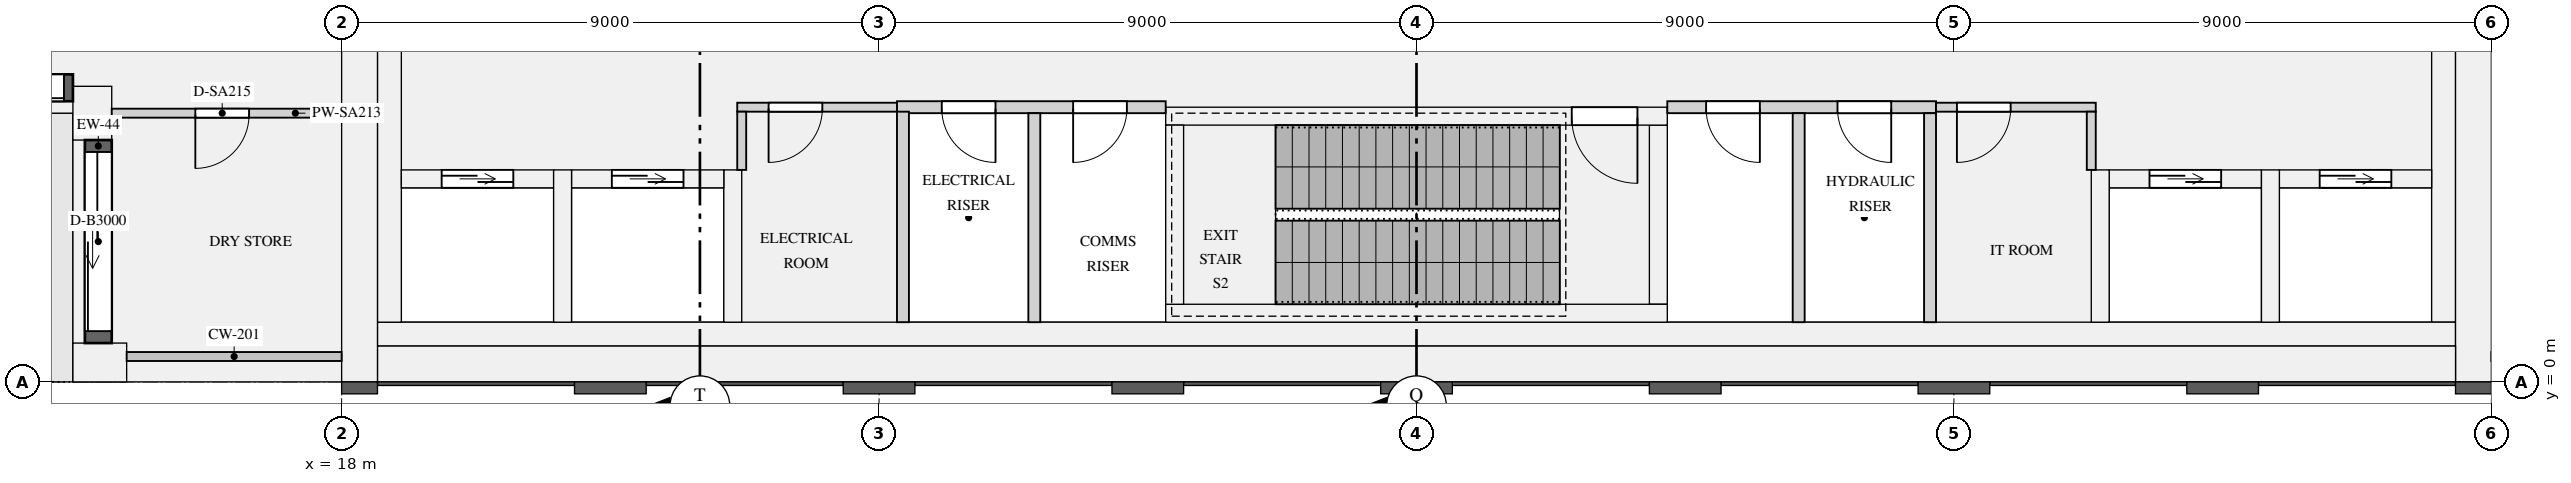
"""IFC4 building model, lengths in metres.
Left out: names, types, materials, properties, quantities, classifications, styles, units other than length and angle.
Written with IfcOpenShell. Run it as: python <this file> out.ifc"""

import sys

from ifc_helpers import new_model, si_unit, direction, frame, frame_2d, origin, origin_2d, place, context, subcontext, project, spatial, rectangle, extrude, element, fill, save


model = new_model("IFC4")
c1 = context("Model", 3, precision=1e-05, world=origin(), true_north=direction((0.0, 1.0)))
c2 = subcontext(c1, "Body", "Model", "MODEL_VIEW")
j1 = project(units=[si_unit("LENGTHUNIT", "METRE"), si_unit("PLANEANGLEUNIT", "RADIAN")], contexts=[c1])
p1 = place(None, origin())
s1 = spatial("IfcSite", under=j1, at=p1, CompositionType="ELEMENT")
p2 = place(p1, origin())
s2 = spatial("IfcBuilding", under=s1, at=p2, CompositionType="ELEMENT")
p3 = place(p2, frame((0.0, 0.0, 191.7)))
s3 = spatial("IfcBuildingStorey", under=s2, at=p3, CompositionType="ELEMENT", Elevation=191.7)
for number, where, z_axis, x_axis in (
    (1, (13.95, 0.325, 0.0), (0.0, 0.0, 1.0), (1.0, 0.0, 0.0)),
    (2, (13.825, 4.5, 0.0), (0.0, 0.0, 1.0), (0.0, -1.0, 0.0)),
):
    element("IfcColumn", number, at=place(p3, frame(where, z_axis=z_axis, x_axis=x_axis)), inside=s3, PredefinedType="USERDEFINED", context=c2, shape_type="SweptSolid", body=[
        extrude(rectangle(XDim=0.9, YDim=0.65, at=origin_2d()), origin(), (0.0, 0.0, 1.0), 6.3),
    ])
for number, where, z_axis, x_axis in (
    (3, (18.3, 0.0, 0.0), (0.0, 0.0, 1.0), (0.0, 1.0, 0.0)),
    (4, (53.7, 0.0, 0.0), (0.0, 0.0, 1.0), (0.0, 1.0, 0.0)),
):
    element("IfcWall", number, at=place(p3, frame(where, z_axis=z_axis, x_axis=x_axis)), inside=s3, PredefinedType="SHEAR", context=c2, shape_type="SweptSolid", body=[
        extrude(rectangle(XDim=12.5, YDim=0.6, at=frame_2d((6.25, 0.0))), origin(), (0.0, 0.0, 1.0), 6.3),
    ])
p4 = place(p3, frame((18.6, 0.3, 0.0), z_axis=(0.0, 0.0, 1.0), x_axis=(1.0, 0.0, 0.0)))
e5 = element("IfcWall", 5, at=p4, inside=s3, PredefinedType="SHEAR", context=c2, shape_type="SweptSolid", body=[
    extrude(rectangle(XDim=34.8, YDim=0.6, at=frame_2d((17.4, 0.0))), origin(), (0.0, 0.0, 1.0), 6.3),
])
for number, where, z_axis, x_axis in (
    (6, (18.8, 1.0, 0.0), (0.0, 0.0, 1.0), (0.0, 1.0, 0.0)),
    (7, (53.2, 1.0, 0.0), (0.0, 0.0, 1.0), (0.0, 1.0, 0.0)),
):
    element("IfcWall", number, at=place(p3, frame(where, z_axis=z_axis, x_axis=x_axis)), inside=s3, PredefinedType="SHEAR", context=c2, shape_type="SweptSolid", body=[
        extrude(rectangle(XDim=10.9, YDim=0.4, at=frame_2d((5.45, 0.0))), origin(), (0.0, 0.0, 1.0), 6.3),
    ])
p5 = place(p3, frame((18.6, 0.8, 0.0), z_axis=(0.0, 0.0, 1.0), x_axis=(1.0, 0.0, 0.0)))
e8 = element("IfcWall", 8, at=p5, inside=s3, PredefinedType="SHEAR", context=c2, shape_type="SweptSolid", body=[
    extrude(rectangle(XDim=34.8, YDim=0.4, at=frame_2d((17.4, 0.0))), origin(), (0.0, 0.0, 1.0), 6.3),
])
p6 = place(p3, frame((19.0, 3.4, 0.0), z_axis=(0.0, 0.0, 1.0), x_axis=(1.0, 0.0, 0.0)))
e9 = element("IfcWall", 9, at=p6, inside=s3, PredefinedType="SHEAR", context=c2, shape_type="SweptSolid", body=[
    extrude(rectangle(XDim=2.55, YDim=0.3, at=frame_2d((1.275, 0.0))), origin(), (0.0, 0.0, 1.0), 6.3),
])
p7 = place(p6, frame((0.675, 0.0, 0.0)))
e10 = element("IfcOpeningElement", 10, at=p7, cuts=e9, PredefinedType="OPENING", context=c2, shape_type="SweptSolid", body=[
    extrude(rectangle(XDim=1.2, YDim=2.1, at=frame_2d((0.6, 1.05))), frame((0.0, 0.16, 0.0), z_axis=(0.0, -1.0, 0.0), x_axis=(1.0, 0.0, 0.0)), (0.0, 0.0, 1.0), 0.32),
])
p8 = place(p3, frame((21.85, 3.4, 0.0), z_axis=(0.0, 0.0, 1.0), x_axis=(1.0, 0.0, 0.0)))
e11 = element("IfcWall", 11, at=p8, inside=s3, PredefinedType="SHEAR", context=c2, shape_type="SweptSolid", body=[
    extrude(rectangle(XDim=2.55, YDim=0.3, at=frame_2d((1.275, 0.0))), origin(), (0.0, 0.0, 1.0), 6.3),
])
p9 = place(p8, frame((0.675, 0.0, 0.0)))
e12 = element("IfcOpeningElement", 12, at=p9, cuts=e11, PredefinedType="OPENING", context=c2, shape_type="SweptSolid", body=[
    extrude(rectangle(XDim=1.2, YDim=2.1, at=frame_2d((0.6, 1.05))), frame((0.0, 0.16, 0.0), z_axis=(0.0, -1.0, 0.0), x_axis=(1.0, 0.0, 0.0)), (0.0, 0.0, 1.0), 0.32),
])
for number, where, z_axis, x_axis in (
    (13, (21.7, 1.0, 0.0), (0.0, 0.0, 1.0), (0.0, 1.0, 0.0)),
    (14, (24.55, 1.0, 0.0), (0.0, 0.0, 1.0), (0.0, 1.0, 0.0)),
):
    element("IfcWall", number, at=place(p3, frame(where, z_axis=z_axis, x_axis=x_axis)), inside=s3, PredefinedType="SHEAR", context=c2, shape_type="SweptSolid", body=[
        extrude(rectangle(XDim=2.55, YDim=0.3, at=frame_2d((1.275, 0.0))), origin(), (0.0, 0.0, 1.0), 6.3),
    ])
p10 = place(p3, frame((47.6, 3.4, 0.0), z_axis=(0.0, 0.0, 1.0), x_axis=(1.0, 0.0, 0.0)))
e15 = element("IfcWall", 15, at=p10, inside=s3, PredefinedType="SHEAR", context=c2, shape_type="SweptSolid", body=[
    extrude(rectangle(XDim=2.55, YDim=0.3, at=frame_2d((1.275, 0.0))), origin(), (0.0, 0.0, 1.0), 6.3),
])
p11 = place(p10, frame((0.675, 0.0, 0.0)))
e16 = element("IfcOpeningElement", 16, at=p11, cuts=e15, PredefinedType="OPENING", context=c2, shape_type="SweptSolid", body=[
    extrude(rectangle(XDim=1.2, YDim=2.1, at=frame_2d((0.6, 1.05))), frame((0.0, 0.16, 0.0), z_axis=(0.0, -1.0, 0.0), x_axis=(1.0, 0.0, 0.0)), (0.0, 0.0, 1.0), 0.32),
])
p12 = place(p3, frame((47.45, 1.0, 0.0), z_axis=(0.0, 0.0, 1.0), x_axis=(0.0, 1.0, 0.0)))
e17 = element("IfcWall", 17, at=p12, inside=s3, PredefinedType="SHEAR", context=c2, shape_type="SweptSolid", body=[
    extrude(rectangle(XDim=2.55, YDim=0.3, at=frame_2d((1.275, 0.0))), origin(), (0.0, 0.0, 1.0), 6.3),
])
p13 = place(p3, frame((50.45, 3.4, 0.0), z_axis=(0.0, 0.0, 1.0), x_axis=(1.0, 0.0, 0.0)))
e18 = element("IfcWall", 18, at=p13, inside=s3, PredefinedType="SHEAR", context=c2, shape_type="SweptSolid", body=[
    extrude(rectangle(XDim=2.55, YDim=0.3, at=frame_2d((1.275, 0.0))), origin(), (0.0, 0.0, 1.0), 6.3),
])
p14 = place(p13, frame((0.675, 0.0, 0.0)))
e19 = element("IfcOpeningElement", 19, at=p14, cuts=e18, PredefinedType="OPENING", context=c2, shape_type="SweptSolid", body=[
    extrude(rectangle(XDim=1.2, YDim=2.1, at=frame_2d((0.6, 1.05))), frame((0.0, 0.16, 0.0), z_axis=(0.0, -1.0, 0.0), x_axis=(1.0, 0.0, 0.0)), (0.0, 0.0, 1.0), 0.32),
])
p15 = place(p3, frame((50.3, 1.0, 0.0), z_axis=(0.0, 0.0, 1.0), x_axis=(0.0, 1.0, 0.0)))
e20 = element("IfcWall", 20, at=p15, inside=s3, PredefinedType="SHEAR", context=c2, shape_type="SweptSolid", body=[
    extrude(rectangle(XDim=2.55, YDim=0.3, at=frame_2d((1.275, 0.0))), origin(), (0.0, 0.0, 1.0), 6.3),
])
p16 = place(p3, frame((31.8, 1.15, 0.0), z_axis=(0.0, 0.0, 1.0), x_axis=(1.0, 0.0, 0.0)))
e21 = element("IfcWall", 21, at=p16, inside=s3, PredefinedType="SHEAR", context=c2, shape_type="SweptSolid", body=[
    extrude(rectangle(XDim=8.4, YDim=0.3, at=frame_2d((4.2, 0.0))), origin(), (0.0, 0.0, 1.0), 6.3),
])
p17 = place(p3, frame((31.8, 4.45, 0.0), z_axis=(0.0, 0.0, 1.0), x_axis=(1.0, 0.0, 0.0)))
e22 = element("IfcWall", 22, at=p17, inside=s3, PredefinedType="SHEAR", context=c2, shape_type="SweptSolid", body=[
    extrude(rectangle(XDim=8.4, YDim=0.3, at=frame_2d((4.2, 0.0))), origin(), (0.0, 0.0, 1.0), 6.3),
])
p18 = place(p17, frame((6.8, 0.0, 0.0)))
e23 = element("IfcOpeningElement", 23, at=p18, cuts=e22, PredefinedType="OPENING", context=c2, shape_type="SweptSolid", body=[
    extrude(rectangle(XDim=1.1, YDim=2.1, at=frame_2d((0.55, 1.05))), frame((0.0, 0.16, 0.0), z_axis=(0.0, -1.0, 0.0), x_axis=(1.0, 0.0, 0.0)), (0.0, 0.0, 1.0), 0.32),
])
for number, where, z_axis, x_axis in (
    (24, (31.95, 1.3, 0.0), (0.0, 0.0, 1.0), (0.0, 1.0, 0.0)),
    (25, (40.05, 1.3, 0.0), (0.0, 0.0, 1.0), (0.0, 1.0, 0.0)),
):
    element("IfcWall", number, at=place(p3, frame(where, z_axis=z_axis, x_axis=x_axis)), inside=s3, PredefinedType="SHEAR", context=c2, shape_type="SweptSolid", body=[
        extrude(rectangle(XDim=3.0, YDim=0.3, at=frame_2d((1.5, 0.0))), origin(), (0.0, 0.0, 1.0), 6.3),
    ])
p19 = place(p3, frame((9.9, 4.925, 0.0), z_axis=(0.0, 0.0, 1.0), x_axis=(1.0, 0.0, 0.0)))
e26 = element("IfcWall", 26, at=p19, inside=s3, PredefinedType="SOLIDWALL", context=c2, shape_type="SweptSolid", body=[
    extrude(rectangle(XDim=3.6, YDim=0.45, at=frame_2d((1.8, 0.0))), origin(), (0.0, 0.0, 1.0), 5.98),
])
p20 = place(p19, frame((0.15, 0.0, 0.0)))
e27 = element("IfcOpeningElement", 27, at=p20, cuts=e26, PredefinedType="OPENING", context=c2, shape_type="SweptSolid", body=[
    extrude(rectangle(XDim=3.3, YDim=2.3, at=frame_2d((1.65, 1.15))), frame((0.0, 0.235, 0.0), z_axis=(0.0, -1.0, 0.0), x_axis=(1.0, 0.0, 0.0)), (0.0, 0.0, 1.0), 0.47),
])
p21 = place(p3, frame((13.925, 4.05, 0.0), z_axis=(0.0, 0.0, 1.0), x_axis=(0.0, -1.0, 0.0)))
e28 = element("IfcWall", 28, at=p21, inside=s3, PredefinedType="SOLIDWALL", context=c2, shape_type="SweptSolid", body=[
    extrude(rectangle(XDim=3.4, YDim=0.45, at=frame_2d((1.7, 0.0))), origin(), (0.0, 0.0, 1.0), 5.98),
])
p22 = place(p21, frame((0.2, 0.0, 0.0)))
e29 = element("IfcOpeningElement", 29, at=p22, cuts=e28, PredefinedType="OPENING", context=c2, shape_type="SweptSolid", body=[
    extrude(rectangle(XDim=3.0, YDim=2.3, at=frame_2d((1.5, 1.15))), frame((0.0, 0.235, 0.0), z_axis=(0.0, -1.0, 0.0), x_axis=(1.0, 0.0, 0.0)), (0.0, 0.0, 1.0), 0.47),
])
p23 = place(p3, frame((27.3, 4.6, 0.0), z_axis=(0.0, 0.0, 1.0), x_axis=(1.0, 0.0, 0.0)))
e30 = element("IfcWall", 30, at=p23, inside=s3, PredefinedType="PARTITIONING", context=c2, shape_type="SweptSolid", body=[
    extrude(rectangle(XDim=4.5, YDim=0.2, at=frame_2d((2.25, 0.0))), origin(), (0.0, 0.0, 1.0), 5.98),
])
p24 = place(p23, frame((0.75, 0.0, 0.0)))
e31 = element("IfcOpeningElement", 31, at=p24, cuts=e30, PredefinedType="OPENING", context=c2, shape_type="SweptSolid", body=[
    extrude(rectangle(XDim=0.9, YDim=2.1, at=frame_2d((0.45, 1.05))), frame((0.0, 0.11, 0.0), z_axis=(0.0, -1.0, 0.0), x_axis=(1.0, 0.0, 0.0)), (0.0, 0.0, 1.0), 0.22),
])
p25 = place(p23, frame((2.95, 0.0, 0.0)))
e32 = element("IfcOpeningElement", 32, at=p25, cuts=e30, PredefinedType="OPENING", context=c2, shape_type="SweptSolid", body=[
    extrude(rectangle(XDim=0.9, YDim=2.1, at=frame_2d((0.45, 1.05))), frame((0.0, 0.11, 0.0), z_axis=(0.0, -1.0, 0.0), x_axis=(1.0, 0.0, 0.0)), (0.0, 0.0, 1.0), 0.22),
])
p26 = place(p3, frame((40.2, 4.6, 0.0), z_axis=(0.0, 0.0, 1.0), x_axis=(1.0, 0.0, 0.0)))
e33 = element("IfcWall", 33, at=p26, inside=s3, PredefinedType="PARTITIONING", context=c2, shape_type="SweptSolid", body=[
    extrude(rectangle(XDim=4.5, YDim=0.2, at=frame_2d((2.25, 0.0))), origin(), (0.0, 0.0, 1.0), 5.98),
])
p27 = place(p26, frame((0.65, 0.0, 0.0)))
e34 = element("IfcOpeningElement", 34, at=p27, cuts=e33, PredefinedType="OPENING", context=c2, shape_type="SweptSolid", body=[
    extrude(rectangle(XDim=0.9, YDim=2.1, at=frame_2d((0.45, 1.05))), frame((0.0, 0.11, 0.0), z_axis=(0.0, -1.0, 0.0), x_axis=(1.0, 0.0, 0.0)), (0.0, 0.0, 1.0), 0.22),
])
p28 = place(p26, frame((2.85, 0.0, 0.0)))
e35 = element("IfcOpeningElement", 35, at=p28, cuts=e33, PredefinedType="OPENING", context=c2, shape_type="SweptSolid", body=[
    extrude(rectangle(XDim=0.9, YDim=2.1, at=frame_2d((0.45, 1.05))), frame((0.0, 0.11, 0.0), z_axis=(0.0, -1.0, 0.0), x_axis=(1.0, 0.0, 0.0)), (0.0, 0.0, 1.0), 0.22),
])
p29 = place(p3, frame((24.625, 4.6, 0.0), z_axis=(0.0, 0.0, 1.0), x_axis=(1.0, 0.0, 0.0)))
e36 = element("IfcWall", 36, at=p29, inside=s3, PredefinedType="PARTITIONING", context=c2, shape_type="SweptSolid", body=[
    extrude(rectangle(XDim=2.675, YDim=0.15, at=frame_2d((1.337, 0.0))), origin(), (0.0, 0.0, 1.0), 5.98),
])
p30 = place(p29, frame((0.525, 0.0, 0.0)))
e37 = element("IfcOpeningElement", 37, at=p30, cuts=e36, PredefinedType="OPENING", context=c2, shape_type="SweptSolid", body=[
    extrude(rectangle(XDim=0.9, YDim=2.1, at=frame_2d((0.45, 1.05))), frame((0.0, 0.085, 0.0), z_axis=(0.0, -1.0, 0.0), x_axis=(1.0, 0.0, 0.0)), (0.0, 0.0, 1.0), 0.17),
])
p31 = place(p3, frame((44.7, 4.6, 0.0), z_axis=(0.0, 0.0, 1.0), x_axis=(1.0, 0.0, 0.0)))
e38 = element("IfcWall", 38, at=p31, inside=s3, PredefinedType="PARTITIONING", context=c2, shape_type="SweptSolid", body=[
    extrude(rectangle(XDim=2.675, YDim=0.15, at=frame_2d((1.337, 0.0))), origin(), (0.0, 0.0, 1.0), 5.98),
])
p32 = place(p31, frame((0.35, 0.0, 0.0)))
e39 = element("IfcOpeningElement", 39, at=p32, cuts=e38, PredefinedType="OPENING", context=c2, shape_type="SweptSolid", body=[
    extrude(rectangle(XDim=0.9, YDim=2.1, at=frame_2d((0.45, 1.05))), frame((0.0, 0.085, 0.0), z_axis=(0.0, -1.0, 0.0), x_axis=(1.0, 0.0, 0.0)), (0.0, 0.0, 1.0), 0.17),
])
p33 = place(p3, frame((27.4, 1.0, 0.0), z_axis=(0.0, 0.0, 1.0), x_axis=(0.0, 1.0, 0.0)))
e40 = element("IfcWall", 40, at=p33, inside=s3, PredefinedType="PARTITIONING", context=c2, shape_type="SweptSolid", body=[
    extrude(rectangle(XDim=3.525, YDim=0.2, at=frame_2d((1.762, 0.0))), origin(), (0.0, 0.0, 1.0), 5.98),
])
for number, where, z_axis, x_axis in (
    (41, (29.6, 1.0, 0.0), (0.0, 0.0, 1.0), (0.0, 1.0, 0.0)),
    (42, (42.4, 1.0, 0.0), (0.0, 0.0, 1.0), (0.0, 1.0, 0.0)),
    (43, (44.6, 1.0, 0.0), (0.0, 0.0, 1.0), (0.0, 1.0, 0.0)),
):
    element("IfcWall", number, at=place(p3, frame(where, z_axis=z_axis, x_axis=x_axis)), inside=s3, PredefinedType="PARTITIONING", context=c2, shape_type="SweptSolid", body=[
        extrude(rectangle(XDim=3.5, YDim=0.2, at=frame_2d((1.75, 0.0))), origin(), (0.0, 0.0, 1.0), 5.98),
    ])
for number, where, z_axis, x_axis in (
    (44, (24.7, 3.55, 0.0), (0.0, 0.0, 1.0), (0.0, 1.0, 0.0)),
    (45, (47.3, 3.55, 0.0), (0.0, 0.0, 1.0), (0.0, 1.0, 0.0)),
):
    element("IfcWall", number, at=place(p3, frame(where, z_axis=z_axis, x_axis=x_axis)), inside=s3, PredefinedType="PARTITIONING", context=c2, shape_type="SweptSolid", body=[
        extrude(rectangle(XDim=0.975, YDim=0.15, at=frame_2d((0.487, 0.0))), origin(), (0.0, 0.0, 1.0), 5.98),
    ])
p34 = place(p3, frame((14.15, 4.5, 0.0), z_axis=(0.0, 0.0, 1.0), x_axis=(1.0, 0.0, 0.0)))
e46 = element("IfcWall", 46, at=p34, inside=s3, PredefinedType="PARTITIONING", context=c2, shape_type="SweptSolid", body=[
    extrude(rectangle(XDim=3.85, YDim=0.15, at=frame_2d((1.925, 0.0))), origin(), (0.0, 0.0, 1.0), 5.98),
])
p35 = place(p34, frame((1.4, 0.0, 0.0)))
e47 = element("IfcOpeningElement", 47, at=p35, cuts=e46, PredefinedType="OPENING", context=c2, shape_type="SweptSolid", body=[
    extrude(rectangle(XDim=0.9, YDim=2.1, at=frame_2d((0.45, 1.05))), frame((0.0, 0.085, 0.0), z_axis=(0.0, -1.0, 0.0), x_axis=(1.0, 0.0, 0.0)), (0.0, 0.0, 1.0), 0.17),
])
p36 = place(p20, origin())
e48 = element("IfcDoor", 48, at=p36, inside=s3, OperationType="SLIDING_TO_LEFT", PredefinedType="DOOR", context=c2, shape_type="SweptSolid", body=[
    extrude(rectangle(XDim=3.3, YDim=2.3, at=frame_2d((1.65, 1.15))), frame((0.0, -0.07, 0.0), z_axis=(0.0, -1.0, 0.0), x_axis=(1.0, 0.0, 0.0)), (0.0, 0.0, 1.0), 0.05),
])
fill(e27, e48)
p37 = place(p22, origin())
e49 = element("IfcDoor", 49, at=p37, inside=s3, OperationType="SLIDING_TO_LEFT", PredefinedType="DOOR", context=c2, shape_type="SweptSolid", body=[
    extrude(rectangle(XDim=3.0, YDim=2.3, at=frame_2d((1.5, 1.15))), frame((0.0, -0.07, 0.0), z_axis=(0.0, -1.0, 0.0), x_axis=(1.0, 0.0, 0.0)), (0.0, 0.0, 1.0), 0.05),
])
fill(e29, e49)
p38 = place(p7, origin())
e50 = element("IfcDoor", 50, at=p38, inside=s3, OperationType="DOUBLE_DOOR_SLIDING", PredefinedType="DOOR", context=c2, shape_type="SweptSolid", body=[
    extrude(rectangle(XDim=1.2, YDim=2.1, at=frame_2d((0.6, 1.05))), frame((0.0, 0.025, 0.0), z_axis=(0.0, -1.0, 0.0), x_axis=(1.0, 0.0, 0.0)), (0.0, 0.0, 1.0), 0.05),
])
fill(e10, e50)
p39 = place(p9, origin())
e51 = element("IfcDoor", 51, at=p39, inside=s3, OperationType="DOUBLE_DOOR_SLIDING", PredefinedType="DOOR", context=c2, shape_type="SweptSolid", body=[
    extrude(rectangle(XDim=1.2, YDim=2.1, at=frame_2d((0.6, 1.05))), frame((0.0, 0.025, 0.0), z_axis=(0.0, -1.0, 0.0), x_axis=(1.0, 0.0, 0.0)), (0.0, 0.0, 1.0), 0.05),
])
fill(e12, e51)
p40 = place(p11, origin())
e52 = element("IfcDoor", 52, at=p40, inside=s3, OperationType="DOUBLE_DOOR_SLIDING", PredefinedType="DOOR", context=c2, shape_type="SweptSolid", body=[
    extrude(rectangle(XDim=1.2, YDim=2.1, at=frame_2d((0.6, 1.05))), frame((0.0, 0.025, 0.0), z_axis=(0.0, -1.0, 0.0), x_axis=(1.0, 0.0, 0.0)), (0.0, 0.0, 1.0), 0.05),
])
fill(e16, e52)
p41 = place(p14, origin())
e53 = element("IfcDoor", 53, at=p41, inside=s3, OperationType="DOUBLE_DOOR_SLIDING", PredefinedType="DOOR", context=c2, shape_type="SweptSolid", body=[
    extrude(rectangle(XDim=1.2, YDim=2.1, at=frame_2d((0.6, 1.05))), frame((0.0, 0.025, 0.0), z_axis=(0.0, -1.0, 0.0), x_axis=(1.0, 0.0, 0.0)), (0.0, 0.0, 1.0), 0.05),
])
fill(e19, e53)
p42 = place(p18, frame((1.1, 0.0, 0.0), z_axis=(0.0, 0.0, 1.0), x_axis=(-1.0, 0.0, 0.0)))
e54 = element("IfcDoor", 54, at=p42, inside=s3, OperationType="SINGLE_SWING_LEFT", PredefinedType="DOOR", context=c2, shape_type="SweptSolid", body=[
    extrude(rectangle(XDim=1.1, YDim=2.1, at=frame_2d((0.55, 1.05))), frame((0.0, 0.025, 0.0), z_axis=(0.0, -1.0, 0.0), x_axis=(1.0, 0.0, 0.0)), (0.0, 0.0, 1.0), 0.05),
])
fill(e23, e54)
p43 = place(p30, frame((0.9, 0.0, 0.0), z_axis=(0.0, 0.0, 1.0), x_axis=(-1.0, 0.0, 0.0)))
e55 = element("IfcDoor", 55, at=p43, inside=s3, OperationType="SINGLE_SWING_RIGHT", PredefinedType="DOOR", context=c2, shape_type="SweptSolid", body=[
    extrude(rectangle(XDim=0.9, YDim=2.1, at=frame_2d((0.45, 1.05))), frame((0.0, 0.025, 0.0), z_axis=(0.0, -1.0, 0.0), x_axis=(1.0, 0.0, 0.0)), (0.0, 0.0, 1.0), 0.05),
])
fill(e37, e55)
p44 = place(p32, frame((0.9, 0.0, 0.0), z_axis=(0.0, 0.0, 1.0), x_axis=(-1.0, 0.0, 0.0)))
e56 = element("IfcDoor", 56, at=p44, inside=s3, OperationType="SINGLE_SWING_RIGHT", PredefinedType="DOOR", context=c2, shape_type="SweptSolid", body=[
    extrude(rectangle(XDim=0.9, YDim=2.1, at=frame_2d((0.45, 1.05))), frame((0.0, 0.025, 0.0), z_axis=(0.0, -1.0, 0.0), x_axis=(1.0, 0.0, 0.0)), (0.0, 0.0, 1.0), 0.05),
])
fill(e39, e56)
p45 = place(p24, frame((0.9, 0.0, 0.0), z_axis=(0.0, 0.0, 1.0), x_axis=(-1.0, 0.0, 0.0)))
e57 = element("IfcDoor", 57, at=p45, inside=s3, OperationType="SINGLE_SWING_LEFT", PredefinedType="DOOR", context=c2, shape_type="SweptSolid", body=[
    extrude(rectangle(XDim=0.9, YDim=2.1, at=frame_2d((0.45, 1.05))), frame((0.0, 0.025, 0.0), z_axis=(0.0, -1.0, 0.0), x_axis=(1.0, 0.0, 0.0)), (0.0, 0.0, 1.0), 0.05),
])
fill(e31, e57)
p46 = place(p25, frame((0.9, 0.0, 0.0), z_axis=(0.0, 0.0, 1.0), x_axis=(-1.0, 0.0, 0.0)))
e58 = element("IfcDoor", 58, at=p46, inside=s3, OperationType="SINGLE_SWING_RIGHT", PredefinedType="DOOR", context=c2, shape_type="SweptSolid", body=[
    extrude(rectangle(XDim=0.9, YDim=2.1, at=frame_2d((0.45, 1.05))), frame((0.0, 0.025, 0.0), z_axis=(0.0, -1.0, 0.0), x_axis=(1.0, 0.0, 0.0)), (0.0, 0.0, 1.0), 0.05),
])
fill(e32, e58)
p47 = place(p27, frame((0.9, 0.0, 0.0), z_axis=(0.0, 0.0, 1.0), x_axis=(-1.0, 0.0, 0.0)))
e59 = element("IfcDoor", 59, at=p47, inside=s3, OperationType="SINGLE_SWING_LEFT", PredefinedType="DOOR", context=c2, shape_type="SweptSolid", body=[
    extrude(rectangle(XDim=0.9, YDim=2.1, at=frame_2d((0.45, 1.05))), frame((0.0, 0.025, 0.0), z_axis=(0.0, -1.0, 0.0), x_axis=(1.0, 0.0, 0.0)), (0.0, 0.0, 1.0), 0.05),
])
fill(e34, e59)
p48 = place(p28, frame((0.9, 0.0, 0.0), z_axis=(0.0, 0.0, 1.0), x_axis=(-1.0, 0.0, 0.0)))
e60 = element("IfcDoor", 60, at=p48, inside=s3, OperationType="SINGLE_SWING_LEFT", PredefinedType="DOOR", context=c2, shape_type="SweptSolid", body=[
    extrude(rectangle(XDim=0.9, YDim=2.1, at=frame_2d((0.45, 1.05))), frame((0.0, 0.025, 0.0), z_axis=(0.0, -1.0, 0.0), x_axis=(1.0, 0.0, 0.0)), (0.0, 0.0, 1.0), 0.05),
])
fill(e35, e60)
p49 = place(p35, frame((0.9, 0.0, 0.0), z_axis=(0.0, 0.0, 1.0), x_axis=(-1.0, 0.0, 0.0)))
e61 = element("IfcDoor", 61, at=p49, inside=s3, OperationType="SINGLE_SWING_RIGHT", PredefinedType="DOOR", context=c2, shape_type="SweptSolid", body=[
    extrude(rectangle(XDim=0.9, YDim=2.1, at=frame_2d((0.45, 1.05))), frame((0.0, 0.025, 0.0), z_axis=(0.0, -1.0, 0.0), x_axis=(1.0, 0.0, 0.0)), (0.0, 0.0, 1.0), 0.05),
])
fill(e47, e61)
save(model, sys.argv[1])
